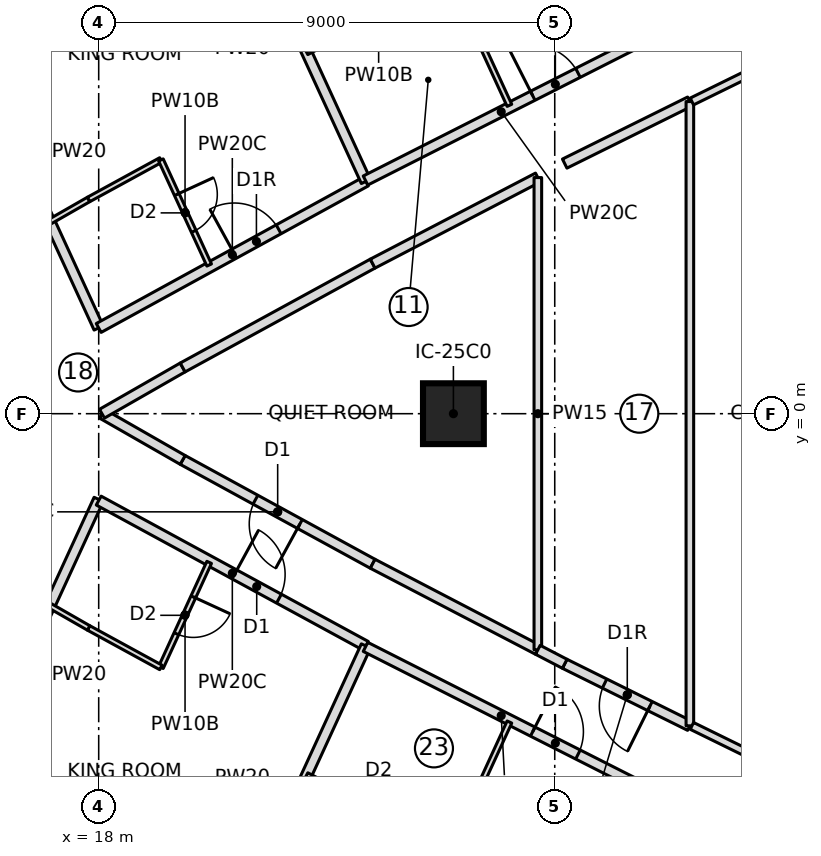
"""IFC4 building model, lengths in metres.
Left out: names, types, materials, properties, quantities, classifications, styles, units other than length and angle.
Written with IfcOpenShell. Run it as: python <this file> out.ifc"""

import sys

from ifc_helpers import new_model, si_unit, direction, frame, frame_2d, origin, origin_2d, place, context, subcontext, project, spatial, rectangle, extrude, element, fill, save


model = new_model("IFC4")
c1 = context("Model", 3, precision=1e-05, world=origin(), true_north=direction((0.0, 1.0)))
c2 = subcontext(c1, "Body", "Model", "MODEL_VIEW")
j1 = project(units=[si_unit("LENGTHUNIT", "METRE"), si_unit("PLANEANGLEUNIT", "RADIAN")], contexts=[c1])
p1 = place(None, origin())
s1 = spatial("IfcSite", under=j1, at=p1, CompositionType="ELEMENT")
p2 = place(p1, origin())
s2 = spatial("IfcBuilding", under=s1, at=p2, CompositionType="ELEMENT")
p3 = place(p2, frame((0.0, 0.0, 106.2)))
s3 = spatial("IfcBuildingStorey", under=s2, at=p3, CompositionType="ELEMENT", Elevation=106.2)
p4 = place(p3, frame((25.0, 0.0, 0.0), z_axis=(0.0, 0.0, 1.0), x_axis=(1.0, 0.0, 0.0)))
e1 = element("IfcColumn", 1, at=p4, inside=s3, PredefinedType="COLUMN", context=c2, shape_type="SweptSolid", body=[
    extrude(rectangle(XDim=1.2, YDim=1.2, at=origin_2d()), origin(), (0.0, 0.0, 1.0), 3.55),
])
p5 = place(p3, frame((14.815, 8.626, 0.0), z_axis=(0.0, 0.0, 1.0), x_axis=(0.417432341259, -0.908708006166, 0.0)))
e2 = element("IfcWall", 2, at=p5, inside=s3, PredefinedType="PARTITIONING", context=c2, shape_type="SweptSolid", body=[
    extrude(rectangle(XDim=7.631, YDim=0.2, at=frame_2d((3.815, 0.0))), origin(), (0.0, 0.0, 1.0), 3.25),
])
p6 = place(p3, frame((18.0, 1.692, 0.0), z_axis=(0.0, 0.0, 1.0), x_axis=(0.876809096721, 0.480838650597, 0.0)))
e3 = element("IfcWall", 3, at=p6, inside=s3, PredefinedType="PARTITIONING", context=c2, shape_type="SweptSolid", body=[
    extrude(rectangle(XDim=6.015, YDim=0.2, at=frame_2d((3.008, 0.0))), origin(), (0.0, 0.0, 1.0), 3.25),
])
p7 = place(p6, frame((3.05, 0.0, 0.0)))
e4 = element("IfcOpeningElement", 4, at=p7, cuts=e3, PredefinedType="OPENING", context=c2, shape_type="SweptSolid", body=[
    extrude(rectangle(XDim=1.0, YDim=2.1, at=frame_2d((0.5, 1.05))), frame((0.0, 0.11, 0.0), z_axis=(0.0, -1.0, 0.0), x_axis=(1.0, 0.0, 0.0)), (0.0, 0.0, 1.0), 0.22),
])
p8 = place(p3, frame((17.036, 3.79, 0.0), z_axis=(0.0, 0.0, 1.0), x_axis=(0.867629162742, 0.497211862248, 0.0)))
e5 = element("IfcWall", 5, at=p8, inside=s3, PredefinedType="PARTITIONING", context=c2, shape_type="SweptSolid", body=[
    extrude(rectangle(XDim=0.882, YDim=0.1, at=frame_2d((0.441, 0.0))), origin(), (0.0, 0.0, 1.0), 3.25),
])
p9 = place(p3, frame((17.801, 4.229, 0.0), z_axis=(0.0, 0.0, 1.0), x_axis=(0.877424481957, 0.479714788663, 0.0)))
e6 = element("IfcWall", 6, at=p9, inside=s3, PredefinedType="PARTITIONING", context=c2, shape_type="SweptSolid", body=[
    extrude(rectangle(XDim=1.625, YDim=0.1, at=frame_2d((0.813, 0.0))), origin(), (0.0, 0.0, 1.0), 3.25),
])
p10 = place(p3, frame((19.228, 5.008, 0.0), z_axis=(0.0, 0.0, 1.0), x_axis=(0.417450047292, -0.908699872354, 0.0)))
e7 = element("IfcWall", 7, at=p10, inside=s3, PredefinedType="PARTITIONING", context=c2, shape_type="SweptSolid", body=[
    extrude(rectangle(XDim=2.283, YDim=0.1, at=frame_2d((1.141, 0.0))), origin(), (0.0, 0.0, 1.0), 3.25),
])
p11 = place(p10, frame((0.75, 0.0, 0.0)))
e8 = element("IfcOpeningElement", 8, at=p11, cuts=e7, PredefinedType="OPENING", context=c2, shape_type="SweptSolid", body=[
    extrude(rectangle(XDim=0.8, YDim=2.1, at=frame_2d((0.4, 1.05))), frame((0.0, 0.06, 0.0), z_axis=(0.0, -1.0, 0.0), x_axis=(1.0, 0.0, 0.0)), (0.0, 0.0, 1.0), 0.12),
])
p12 = place(p3, frame((23.274, 4.584, 0.0), z_axis=(0.0, 0.0, 1.0), x_axis=(-0.417440028355, 0.908704474913, 0.0)))
e9 = element("IfcWall", 9, at=p12, inside=s3, PredefinedType="PARTITIONING", context=c2, shape_type="SweptSolid", body=[
    extrude(rectangle(XDim=7.61, YDim=0.2, at=frame_2d((3.805, 0.0))), origin(), (0.0, 0.0, 1.0), 3.25),
])
p13 = place(p3, frame((23.266, 4.602, 0.0), z_axis=(0.0, 0.0, 1.0), x_axis=(0.892007141151, 0.452021304958, 0.0)))
e10 = element("IfcWall", 10, at=p13, inside=s3, PredefinedType="PARTITIONING", context=c2, shape_type="SweptSolid", body=[
    extrude(rectangle(XDim=6.004, YDim=0.2, at=frame_2d((3.002, 0.0))), origin(), (0.0, 0.0, 1.0), 3.25),
])
p14 = place(p13, frame((3.7, 0.0, 0.0)))
e11 = element("IfcOpeningElement", 11, at=p14, cuts=e10, PredefinedType="OPENING", context=c2, shape_type="SweptSolid", body=[
    extrude(rectangle(XDim=1.0, YDim=2.1, at=frame_2d((0.5, 1.05))), frame((0.0, 0.11, 0.0), z_axis=(0.0, -1.0, 0.0), x_axis=(1.0, 0.0, 0.0)), (0.0, 0.0, 1.0), 0.22),
])
p15 = place(p3, frame((22.104, 7.132, 0.0), z_axis=(0.0, 0.0, 1.0), x_axis=(0.886865947566, 0.46202682936, 0.0)))
e12 = element("IfcWall", 12, at=p15, inside=s3, PredefinedType="PARTITIONING", context=c2, shape_type="SweptSolid", body=[
    extrude(rectangle(XDim=3.204, YDim=0.1, at=frame_2d((1.602, 0.0))), origin(), (0.0, 0.0, 1.0), 3.25),
])
p16 = place(p15, frame((1.2, 0.0, 0.0)))
e13 = element("IfcOpeningElement", 13, at=p16, cuts=e12, PredefinedType="OPENING", context=c2, shape_type="SweptSolid", body=[
    extrude(rectangle(XDim=0.8, YDim=2.1, at=frame_2d((0.4, 1.05))), frame((0.0, 0.06, 0.0), z_axis=(0.0, -1.0, 0.0), x_axis=(1.0, 0.0, 0.0)), (0.0, 0.0, 1.0), 0.12),
])
p17 = place(p3, frame((24.945, 8.612, 0.0), z_axis=(0.0, 0.0, 1.0), x_axis=(0.417431588167, -0.908708352113, 0.0)))
e14 = element("IfcWall", 14, at=p17, inside=s3, PredefinedType="PARTITIONING", context=c2, shape_type="SweptSolid", body=[
    extrude(rectangle(XDim=2.781, YDim=0.1, at=frame_2d((1.39, 0.0))), origin(), (0.0, 0.0, 1.0), 3.25),
])
p18 = place(p3, frame((14.815, -8.626, 0.0), z_axis=(0.0, 0.0, 1.0), x_axis=(0.417432341259, 0.908708006166, 0.0)))
e15 = element("IfcWall", 15, at=p18, inside=s3, PredefinedType="PARTITIONING", context=c2, shape_type="SweptSolid", body=[
    extrude(rectangle(XDim=7.631, YDim=0.2, at=frame_2d((3.815, 0.0))), origin(), (0.0, 0.0, 1.0), 3.25),
])
p19 = place(p3, frame((18.0, -1.715, 0.0), z_axis=(0.0, 0.0, 1.0), x_axis=(0.878415628048, -0.477897462225, 0.0)))
e16 = element("IfcWall", 16, at=p19, inside=s3, PredefinedType="PARTITIONING", context=c2, shape_type="SweptSolid", body=[
    extrude(rectangle(XDim=6.004, YDim=0.2, at=frame_2d((3.002, 0.0))), origin(), (0.0, 0.0, 1.0), 3.25),
])
p20 = place(p19, frame((3.05, 0.0, 0.0)))
e17 = element("IfcOpeningElement", 17, at=p20, cuts=e16, PredefinedType="OPENING", context=c2, shape_type="SweptSolid", body=[
    extrude(rectangle(XDim=1.0, YDim=2.1, at=frame_2d((0.5, 1.05))), frame((0.0, 0.11, 0.0), z_axis=(0.0, -1.0, 0.0), x_axis=(1.0, 0.0, 0.0)), (0.0, 0.0, 1.0), 0.22),
])
p21 = place(p3, frame((20.18, -2.934, 0.0), z_axis=(0.0, 0.0, 1.0), x_axis=(-0.417450047292, -0.908699872354, 0.0)))
e18 = element("IfcWall", 18, at=p21, inside=s3, PredefinedType="PARTITIONING", context=c2, shape_type="SweptSolid", body=[
    extrude(rectangle(XDim=2.283, YDim=0.1, at=frame_2d((1.141, 0.0))), origin(), (0.0, 0.0, 1.0), 3.25),
])
p22 = place(p21, frame((0.75, 0.0, 0.0)))
e19 = element("IfcOpeningElement", 19, at=p22, cuts=e18, PredefinedType="OPENING", context=c2, shape_type="SweptSolid", body=[
    extrude(rectangle(XDim=0.8, YDim=2.1, at=frame_2d((0.4, 1.05))), frame((0.0, 0.06, 0.0), z_axis=(0.0, -1.0, 0.0), x_axis=(1.0, 0.0, 0.0)), (0.0, 0.0, 1.0), 0.12),
])
p23 = place(p3, frame((19.228, -5.008, 0.0), z_axis=(0.0, 0.0, 1.0), x_axis=(-0.877424481957, 0.479714788663, 0.0)))
e20 = element("IfcWall", 20, at=p23, inside=s3, PredefinedType="PARTITIONING", context=c2, shape_type="SweptSolid", body=[
    extrude(rectangle(XDim=1.625, YDim=0.1, at=frame_2d((0.813, 0.0))), origin(), (0.0, 0.0, 1.0), 3.25),
])
p24 = place(p3, frame((17.801, -4.229, 0.0), z_axis=(0.0, 0.0, 1.0), x_axis=(-0.867629162742, 0.497211862248, 0.0)))
e21 = element("IfcWall", 21, at=p24, inside=s3, PredefinedType="PARTITIONING", context=c2, shape_type="SweptSolid", body=[
    extrude(rectangle(XDim=0.882, YDim=0.1, at=frame_2d((0.441, 0.0))), origin(), (0.0, 0.0, 1.0), 3.25),
])
p25 = place(p3, frame((20.098, -11.499, 0.0), z_axis=(0.0, 0.0, 1.0), x_axis=(0.417440028355, 0.908704474913, 0.0)))
e22 = element("IfcWall", 22, at=p25, inside=s3, PredefinedType="PARTITIONING", context=c2, shape_type="SweptSolid", body=[
    extrude(rectangle(XDim=7.61, YDim=0.2, at=frame_2d((3.805, 0.0))), origin(), (0.0, 0.0, 1.0), 3.25),
])
p26 = place(p3, frame((23.266, -4.602, 0.0), z_axis=(0.0, 0.0, 1.0), x_axis=(0.892007141151, -0.452021304958, 0.0)))
e23 = element("IfcWall", 23, at=p26, inside=s3, PredefinedType="PARTITIONING", context=c2, shape_type="SweptSolid", body=[
    extrude(rectangle(XDim=6.004, YDim=0.2, at=frame_2d((3.002, 0.0))), origin(), (0.0, 0.0, 1.0), 3.25),
])
p27 = place(p26, frame((3.7, 0.0, 0.0)))
e24 = element("IfcOpeningElement", 24, at=p27, cuts=e23, PredefinedType="OPENING", context=c2, shape_type="SweptSolid", body=[
    extrude(rectangle(XDim=1.0, YDim=2.1, at=frame_2d((0.5, 1.05))), frame((0.0, 0.11, 0.0), z_axis=(0.0, -1.0, 0.0), x_axis=(1.0, 0.0, 0.0)), (0.0, 0.0, 1.0), 0.22),
])
p28 = place(p3, frame((26.106, -6.085, 0.0), z_axis=(0.0, 0.0, 1.0), x_axis=(-0.417431588167, -0.908708352113, 0.0)))
e25 = element("IfcWall", 25, at=p28, inside=s3, PredefinedType="PARTITIONING", context=c2, shape_type="SweptSolid", body=[
    extrude(rectangle(XDim=2.781, YDim=0.1, at=frame_2d((1.39, 0.0))), origin(), (0.0, 0.0, 1.0), 3.25),
])
p29 = place(p3, frame((24.945, -8.612, 0.0), z_axis=(0.0, 0.0, 1.0), x_axis=(-0.886865947566, 0.46202682936, 0.0)))
e26 = element("IfcWall", 26, at=p29, inside=s3, PredefinedType="PARTITIONING", context=c2, shape_type="SweptSolid", body=[
    extrude(rectangle(XDim=3.204, YDim=0.1, at=frame_2d((1.602, 0.0))), origin(), (0.0, 0.0, 1.0), 3.25),
])
p30 = place(p29, frame((1.2, 0.0, 0.0)))
e27 = element("IfcOpeningElement", 27, at=p30, cuts=e26, PredefinedType="OPENING", context=c2, shape_type="SweptSolid", body=[
    extrude(rectangle(XDim=0.8, YDim=2.1, at=frame_2d((0.4, 1.05))), frame((0.0, 0.06, 0.0), z_axis=(0.0, -1.0, 0.0), x_axis=(1.0, 0.0, 0.0)), (0.0, 0.0, 1.0), 0.12),
])
p31 = place(p3, frame((23.407, -2.962, 0.0), z_axis=(0.0, 0.0, 1.0), x_axis=(-0.877465075585, 0.479640533242, 0.0)))
e28 = element("IfcWall", 28, at=p31, inside=s3, PredefinedType="PARTITIONING", context=c2, shape_type="SweptSolid", body=[
    extrude(rectangle(XDim=4.273, YDim=0.2, at=frame_2d((2.137, 0.0))), origin(), (0.0, 0.0, 1.0), 3.25),
])
p32 = place(p31, frame((1.636, 0.0, 0.0)))
e29 = element("IfcOpeningElement", 29, at=p32, cuts=e28, PredefinedType="OPENING", context=c2, shape_type="SweptSolid", body=[
    extrude(rectangle(XDim=1.0, YDim=2.1, at=frame_2d((0.5, 1.05))), frame((0.0, 0.11, 0.0), z_axis=(0.0, -1.0, 0.0), x_axis=(1.0, 0.0, 0.0)), (0.0, 0.0, 1.0), 0.22),
])
for number, where, z_axis, x_axis in (
    (30, (19.657, -0.912, 0.0), (0.0, 0.0, 1.0), (-0.868, 0.497, 0.0)),
    (31, (18.065, 0.0, 0.0), (0.0, 0.0, 1.0), (0.868, 0.497, 0.0)),
):
    element("IfcWall", number, at=place(p3, frame(where, z_axis=z_axis, x_axis=x_axis)), inside=s3, PredefinedType="PARTITIONING", context=c2, shape_type="SweptSolid", body=[
        extrude(rectangle(XDim=1.835, YDim=0.2, at=frame_2d((0.918, 0.0))), origin(), (0.0, 0.0, 1.0), 3.25),
    ])
p33 = place(p3, frame((19.657, 0.912, 0.0), z_axis=(0.0, 0.0, 1.0), x_axis=(0.877465075585, 0.479640533242, 0.0)))
e32 = element("IfcWall", 32, at=p33, inside=s3, PredefinedType="PARTITIONING", context=c2, shape_type="SweptSolid", body=[
    extrude(rectangle(XDim=4.273, YDim=0.2, at=frame_2d((2.137, 0.0))), origin(), (0.0, 0.0, 1.0), 3.25),
])
for number, where, z_axis, x_axis in (
    (33, (23.407, 2.962, 0.0), (0.0, 0.0, 1.0), (0.887, 0.462, 0.0)),
    (34, (26.667, -4.66, 0.0), (0.0, 0.0, 1.0), (-0.887, 0.462, 0.0)),
):
    element("IfcWall", number, at=place(p3, frame(where, z_axis=z_axis, x_axis=x_axis)), inside=s3, PredefinedType="PARTITIONING", context=c2, shape_type="SweptSolid", body=[
        extrude(rectangle(XDim=3.676, YDim=0.2, at=frame_2d((1.838, 0.0))), origin(), (0.0, 0.0, 1.0), 3.25),
    ])
p34 = place(p3, frame((26.667, -4.66, 0.0), z_axis=(0.0, 0.0, 1.0), x_axis=(0.0, 1.0, 0.0)))
e35 = element("IfcWall", 35, at=p34, inside=s3, PredefinedType="PARTITIONING", context=c2, shape_type="SweptSolid", body=[
    extrude(rectangle(XDim=9.32, YDim=0.15, at=frame_2d((4.66, 0.0))), origin(), (0.0, 0.0, 1.0), 3.25),
])
p35 = place(p3, frame((29.667, -6.16, 0.0), z_axis=(0.0, 0.0, 1.0), x_axis=(-0.895945057464, 0.444164895062, 0.0)))
e36 = element("IfcWall", 36, at=p35, inside=s3, PredefinedType="PARTITIONING", context=c2, shape_type="SweptSolid", body=[
    extrude(rectangle(XDim=2.757, YDim=0.2, at=frame_2d((1.378, 0.0))), origin(), (0.0, 0.0, 1.0), 3.25),
])
p36 = place(p35, frame((0.878, 0.0, 0.0)))
e37 = element("IfcOpeningElement", 37, at=p36, cuts=e36, PredefinedType="OPENING", context=c2, shape_type="SweptSolid", body=[
    extrude(rectangle(XDim=1.0, YDim=2.1, at=frame_2d((0.5, 1.05))), frame((0.0, 0.11, 0.0), z_axis=(0.0, -1.0, 0.0), x_axis=(1.0, 0.0, 0.0)), (0.0, 0.0, 1.0), 0.22),
])
p37 = place(p3, frame((27.196, 4.936, 0.0), z_axis=(0.0, 0.0, 1.0), x_axis=(0.895945057464, 0.444164895062, 0.0)))
e38 = element("IfcWall", 38, at=p37, inside=s3, PredefinedType="PARTITIONING", context=c2, shape_type="SweptSolid", body=[
    extrude(rectangle(XDim=2.757, YDim=0.2, at=frame_2d((1.378, 0.0))), origin(), (0.0, 0.0, 1.0), 3.25),
])
p38 = place(p3, frame((29.667, -6.16, 0.0), z_axis=(0.0, 0.0, 1.0), x_axis=(0.0, 1.0, 0.0)))
e39 = element("IfcWall", 39, at=p38, inside=s3, PredefinedType="PARTITIONING", context=c2, shape_type="SweptSolid", body=[
    extrude(rectangle(XDim=12.321, YDim=0.15, at=frame_2d((6.16, 0.0))), origin(), (0.0, 0.0, 1.0), 3.25),
])
for number, where, z_axis, x_axis in (
    (40, (31.995, -7.285, 0.0), (0.0, 0.0, 1.0), (-0.898, 0.441, 0.0)),
    (41, (29.707, 6.162, 0.0), (0.0, 0.0, 1.0), (0.898, 0.441, 0.0)),
):
    element("IfcWall", number, at=place(p3, frame(where, z_axis=z_axis, x_axis=x_axis)), inside=s3, PredefinedType="PARTITIONING", context=c2, shape_type="SweptSolid", body=[
        extrude(rectangle(XDim=2.549, YDim=0.15, at=frame_2d((1.275, 0.0))), origin(), (0.0, 0.0, 1.0), 3.25),
    ])
p39 = place(p3, frame((27.196, -4.936, 0.0), z_axis=(0.0, 0.0, 1.0), x_axis=(-0.886948968309, 0.46186743511, 0.0)))
e42 = element("IfcWall", 42, at=p39, inside=s3, PredefinedType="PARTITIONING", context=c2, shape_type="SweptSolid", body=[
    extrude(rectangle(XDim=0.597, YDim=0.2, at=frame_2d((0.299, 0.0))), origin(), (0.0, 0.0, 1.0), 3.25),
])
p40 = place(p11, origin())
e43 = element("IfcDoor", 43, at=p40, inside=s3, OperationType="SINGLE_SWING_LEFT", PredefinedType="DOOR", context=c2, shape_type="SweptSolid", body=[
    extrude(rectangle(XDim=0.8, YDim=2.1, at=frame_2d((0.4, 1.05))), frame((0.0, 0.025, 0.0), z_axis=(0.0, -1.0, 0.0), x_axis=(1.0, 0.0, 0.0)), (0.0, 0.0, 1.0), 0.05),
])
fill(e8, e43)
p41 = place(p7, origin())
e44 = element("IfcDoor", 44, at=p41, inside=s3, OperationType="SINGLE_SWING_RIGHT", PredefinedType="DOOR", context=c2, shape_type="SweptSolid", body=[
    extrude(rectangle(XDim=1.0, YDim=2.1, at=frame_2d((0.5, 1.05))), frame((0.0, 0.025, 0.0), z_axis=(0.0, -1.0, 0.0), x_axis=(1.0, 0.0, 0.0)), (0.0, 0.0, 1.0), 0.05),
])
fill(e4, e44)
p42 = place(p14, origin())
e45 = element("IfcDoor", 45, at=p42, inside=s3, OperationType="SINGLE_SWING_RIGHT", PredefinedType="DOOR", context=c2, shape_type="SweptSolid", body=[
    extrude(rectangle(XDim=1.0, YDim=2.1, at=frame_2d((0.5, 1.05))), frame((0.0, 0.025, 0.0), z_axis=(0.0, -1.0, 0.0), x_axis=(1.0, 0.0, 0.0)), (0.0, 0.0, 1.0), 0.05),
])
fill(e11, e45)
p43 = place(p22, origin())
e46 = element("IfcDoor", 46, at=p43, inside=s3, OperationType="SINGLE_SWING_LEFT", PredefinedType="DOOR", context=c2, shape_type="SweptSolid", body=[
    extrude(rectangle(XDim=0.8, YDim=2.1, at=frame_2d((0.4, 1.05))), frame((0.0, 0.025, 0.0), z_axis=(0.0, -1.0, 0.0), x_axis=(1.0, 0.0, 0.0)), (0.0, 0.0, 1.0), 0.05),
])
fill(e19, e46)
p44 = place(p20, origin())
e47 = element("IfcDoor", 47, at=p44, inside=s3, OperationType="SINGLE_SWING_LEFT", PredefinedType="DOOR", context=c2, shape_type="SweptSolid", body=[
    extrude(rectangle(XDim=1.0, YDim=2.1, at=frame_2d((0.5, 1.05))), frame((0.0, 0.025, 0.0), z_axis=(0.0, -1.0, 0.0), x_axis=(1.0, 0.0, 0.0)), (0.0, 0.0, 1.0), 0.05),
])
fill(e17, e47)
p45 = place(p27, origin())
e48 = element("IfcDoor", 48, at=p45, inside=s3, OperationType="SINGLE_SWING_LEFT", PredefinedType="DOOR", context=c2, shape_type="SweptSolid", body=[
    extrude(rectangle(XDim=1.0, YDim=2.1, at=frame_2d((0.5, 1.05))), frame((0.0, 0.025, 0.0), z_axis=(0.0, -1.0, 0.0), x_axis=(1.0, 0.0, 0.0)), (0.0, 0.0, 1.0), 0.05),
])
fill(e24, e48)
p46 = place(p32, origin())
e49 = element("IfcDoor", 49, at=p46, inside=s3, OperationType="SINGLE_SWING_LEFT", PredefinedType="DOOR", context=c2, shape_type="SweptSolid", body=[
    extrude(rectangle(XDim=1.0, YDim=2.1, at=frame_2d((0.5, 1.05))), frame((0.0, 0.025, 0.0), z_axis=(0.0, -1.0, 0.0), x_axis=(1.0, 0.0, 0.0)), (0.0, 0.0, 1.0), 0.05),
])
fill(e29, e49)
p47 = place(p36, origin())
e50 = element("IfcDoor", 50, at=p47, inside=s3, OperationType="SINGLE_SWING_RIGHT", PredefinedType="DOOR", context=c2, shape_type="SweptSolid", body=[
    extrude(rectangle(XDim=1.0, YDim=2.1, at=frame_2d((0.5, 1.05))), frame((0.0, 0.025, 0.0), z_axis=(0.0, -1.0, 0.0), x_axis=(1.0, 0.0, 0.0)), (0.0, 0.0, 1.0), 0.05),
])
fill(e37, e50)
save(model, sys.argv[1])
